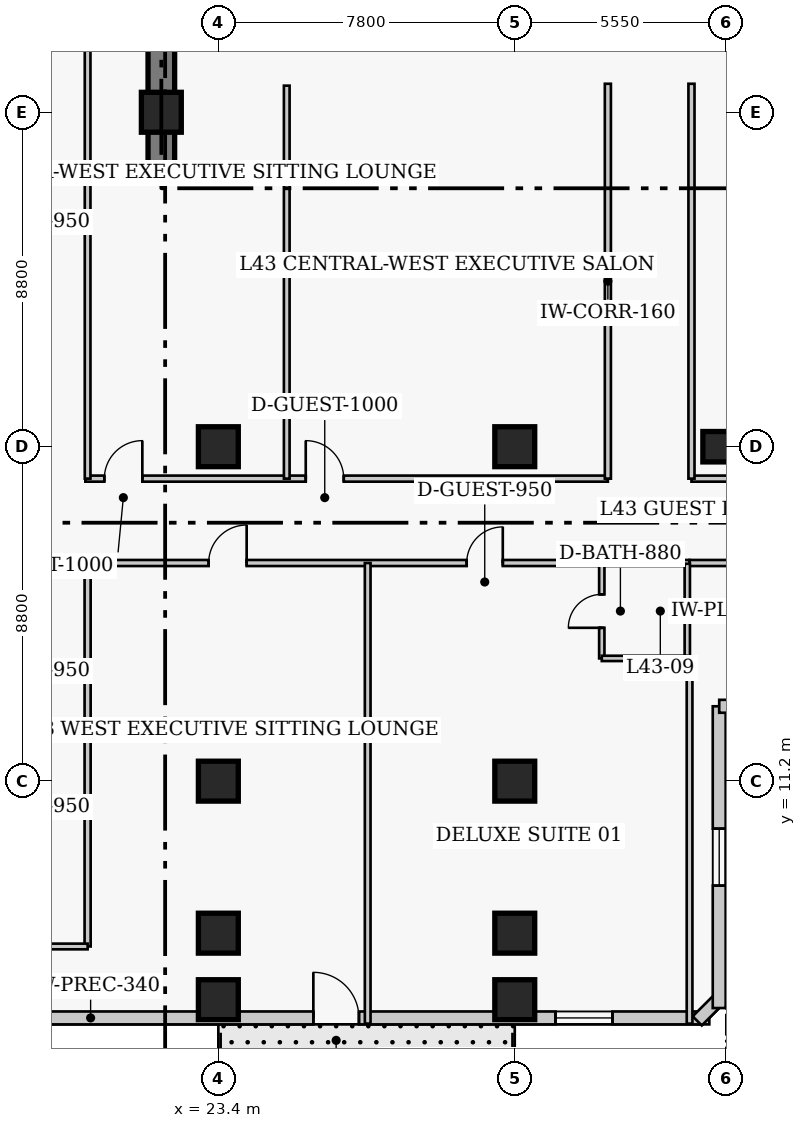
"""IFC4 building model, lengths in metres.
Left out: names, types, materials, properties, quantities, classifications, styles, units other than length and angle.
Written with IfcOpenShell. Run it as: python <this file> out.ifc"""

import sys

from ifc_helpers import new_model, si_unit, direction, frame, frame_2d, origin, origin_2d, place, context, subcontext, project, spatial, rectangle, extrude, element, fill, save


model = new_model("IFC4")
c1 = context("Model", 3, precision=1e-05, world=origin(), true_north=direction((0.0, 1.0)))
c2 = subcontext(c1, "Body", "Model", "MODEL_VIEW")
j1 = project(units=[si_unit("LENGTHUNIT", "METRE"), si_unit("PLANEANGLEUNIT", "RADIAN")], contexts=[c1])
p1 = place(None, origin())
s1 = spatial("IfcSite", under=j1, at=p1, CompositionType="ELEMENT")
p2 = place(p1, origin())
s2 = spatial("IfcBuilding", under=s1, at=p2, CompositionType="ELEMENT")
p3 = place(p2, frame((0.0, 0.0, 172.6)))
s3 = spatial("IfcBuildingStorey", under=s2, at=p3, CompositionType="ELEMENT", Elevation=172.6)
p4 = place(p3, frame((21.9, 27.05, 0.0), z_axis=(0.0, 0.0, 1.0), x_axis=(0.0, 1.0, 0.0)))
e1 = element("IfcWall", 1, at=p4, inside=s3, PredefinedType="SHEAR", context=c2, shape_type="SweptSolid", body=[
    extrude(rectangle(XDim=13.62, YDim=0.7, at=frame_2d((6.81, 0.0))), origin(), (0.0, 0.0, 1.0), 3.8),
])
for number, where, z_axis, x_axis in (
    (2, (23.4, 11.2, 0.0), (0.0, 0.0, 1.0), (1.0, 0.0, 0.0)),
    (3, (23.4, 20.0, 0.0), (0.0, 0.0, 1.0), (1.0, 0.0, 0.0)),
    (4, (31.2, 11.2, 0.0), (0.0, 0.0, 1.0), (1.0, 0.0, 0.0)),
    (5, (31.2, 20.0, 0.0), (0.0, 0.0, 1.0), (1.0, 0.0, 0.0)),
):
    element("IfcColumn", number, at=place(p3, frame(where, z_axis=z_axis, x_axis=x_axis)), inside=s3, PredefinedType="COLUMN", context=c2, shape_type="SweptSolid", body=[
        extrude(rectangle(XDim=1.05, YDim=1.05, at=origin_2d()), origin(), (0.0, 0.0, 1.0), 3.8),
    ])
p5 = place(p3, frame((36.75, 20.0, 0.0), z_axis=(0.0, 0.0, 1.0), x_axis=(1.0, 0.0, 0.0)))
e6 = element("IfcColumn", 6, at=p5, inside=s3, PredefinedType="COLUMN", context=c2, shape_type="SweptSolid", body=[
    extrude(rectangle(XDim=1.2, YDim=0.8, at=origin_2d()), origin(), (0.0, 0.0, 1.0), 3.8),
])
for number, where, z_axis, x_axis in (
    (7, (21.9, 28.8, 0.0), (0.0, 0.0, 1.0), (1.0, 0.0, 0.0)),
    (8, (23.4, 7.2, 0.0), (0.0, 0.0, 1.0), (1.0, 0.0, 0.0)),
    (9, (31.2, 7.2, 0.0), (0.0, 0.0, 1.0), (1.0, 0.0, 0.0)),
    (10, (23.4, 5.45, 0.0), (0.0, 0.0, 1.0), (1.0, 0.0, 0.0)),
    (11, (31.2, 5.45, 0.0), (0.0, 0.0, 1.0), (1.0, 0.0, 0.0)),
):
    element("IfcColumn", number, at=place(p3, frame(where, z_axis=z_axis, x_axis=x_axis)), inside=s3, PredefinedType="COLUMN", context=c2, shape_type="SweptSolid", body=[
        extrude(rectangle(XDim=1.05, YDim=1.05, at=origin_2d()), origin(), (0.0, 0.0, 1.0), 3.8),
    ])
p6 = place(p3, frame((9.63, 4.97, 0.0), z_axis=(0.0, 0.0, 1.0), x_axis=(1.0, 0.0, 0.0)))
e12 = element("IfcWall", 12, at=p6, inside=s3, PredefinedType="SOLIDWALL", context=c2, shape_type="SweptSolid", body=[
    extrude(rectangle(XDim=26.69, YDim=0.34, at=frame_2d((13.345, 0.0))), origin(), (0.0, 0.0, 1.0), 3.55),
])
p7 = place(p6, frame((3.048, 0.0, 0.85)))
e13 = element("IfcOpeningElement", 13, at=p7, cuts=e12, PredefinedType="OPENING", context=c2, shape_type="SweptSolid", body=[
    extrude(rectangle(XDim=1.5, YDim=1.75, at=frame_2d((0.75, 0.875))), frame((0.0, 0.18, 0.0), z_axis=(0.0, -1.0, 0.0), x_axis=(1.0, 0.0, 0.0)), (0.0, 0.0, 1.0), 0.36),
])
p8 = place(p6, frame((22.642, 0.0, 0.85)))
e14 = element("IfcOpeningElement", 14, at=p8, cuts=e12, PredefinedType="OPENING", context=c2, shape_type="SweptSolid", body=[
    extrude(rectangle(XDim=1.5, YDim=1.75, at=frame_2d((0.75, 0.875))), frame((0.0, 0.18, 0.0), z_axis=(0.0, -1.0, 0.0), x_axis=(1.0, 0.0, 0.0)), (0.0, 0.0, 1.0), 0.36),
])
p9 = place(p6, frame((16.27, 0.0, 0.0)))
e15 = element("IfcOpeningElement", 15, at=p9, cuts=e12, PredefinedType="OPENING", context=c2, shape_type="SweptSolid", body=[
    extrude(rectangle(XDim=1.2, YDim=2.1, at=frame_2d((0.6, 1.05))), frame((0.0, 0.18, 0.0), z_axis=(0.0, -1.0, 0.0), x_axis=(1.0, 0.0, 0.0)), (0.0, 0.0, 1.0), 0.36),
])
p10 = place(p3, frame((36.001, 4.892, 0.0), z_axis=(0.0, 0.0, 1.0), x_axis=(0.707106781187, 0.707106781187, 0.0)))
e16 = element("IfcWall", 16, at=p10, inside=s3, PredefinedType="SOLIDWALL", context=c2, shape_type="SweptSolid", body=[
    extrude(rectangle(XDim=0.929, YDim=0.34, at=frame_2d((0.464, 0.0))), origin(), (0.0, 0.0, 1.0), 3.55),
])
p11 = place(p3, frame((36.58, 5.23, 0.0), z_axis=(0.0, 0.0, 1.0), x_axis=(0.0, 1.0, 0.0)))
e17 = element("IfcWall", 17, at=p11, inside=s3, PredefinedType="SOLIDWALL", context=c2, shape_type="SweptSolid", body=[
    extrude(rectangle(XDim=7.94, YDim=0.34, at=frame_2d((3.97, 0.0))), origin(), (0.0, 0.0, 1.0), 3.55),
])
p12 = place(p11, frame((3.22, 0.0, 0.85)))
e18 = element("IfcOpeningElement", 18, at=p12, cuts=e17, PredefinedType="OPENING", context=c2, shape_type="SweptSolid", body=[
    extrude(rectangle(XDim=1.5, YDim=1.75, at=frame_2d((0.75, 0.875))), frame((0.0, 0.18, 0.0), z_axis=(0.0, -1.0, 0.0), x_axis=(1.0, 0.0, 0.0)), (0.0, 0.0, 1.0), 0.36),
])
p13 = place(p3, frame((36.58, 13.17, 0.0), z_axis=(0.0, 0.0, 1.0), x_axis=(1.0, 0.0, 0.0)))
e19 = element("IfcWall", 19, at=p13, inside=s3, PredefinedType="SOLIDWALL", context=c2, shape_type="SweptSolid", body=[
    extrude(rectangle(XDim=4.84, YDim=0.34, at=frame_2d((2.42, 0.0))), origin(), (0.0, 0.0, 1.0), 3.55),
])
p14 = place(p13, frame((1.67, 0.0, 0.85)))
e20 = element("IfcOpeningElement", 20, at=p14, cuts=e19, PredefinedType="OPENING", context=c2, shape_type="SweptSolid", body=[
    extrude(rectangle(XDim=1.5, YDim=1.75, at=frame_2d((0.75, 0.875))), frame((0.0, 0.18, 0.0), z_axis=(0.0, -1.0, 0.0), x_axis=(1.0, 0.0, 0.0)), (0.0, 0.0, 1.0), 0.36),
])
p15 = place(p3, frame((19.9, 19.16, 0.0), z_axis=(0.0, 0.0, 1.0), x_axis=(1.0, 0.0, 0.0)))
e21 = element("IfcWall", 21, at=p15, inside=s3, PredefinedType="PARTITIONING", context=c2, shape_type="SweptSolid", body=[
    extrude(rectangle(XDim=13.75, YDim=0.16, at=frame_2d((6.875, 0.0))), origin(), (0.0, 0.0, 1.0), 3.55),
])
p16 = place(p15, frame((0.5, 0.0, 0.0)))
e22 = element("IfcOpeningElement", 22, at=p16, cuts=e21, PredefinedType="OPENING", context=c2, shape_type="SweptSolid", body=[
    extrude(rectangle(XDim=1.0, YDim=2.15, at=frame_2d((0.5, 1.075))), frame((0.0, 0.09, 0.0), z_axis=(0.0, -1.0, 0.0), x_axis=(1.0, 0.0, 0.0)), (0.0, 0.0, 1.0), 0.18),
])
p17 = place(p15, frame((5.8, 0.0, 0.0)))
e23 = element("IfcOpeningElement", 23, at=p17, cuts=e21, PredefinedType="OPENING", context=c2, shape_type="SweptSolid", body=[
    extrude(rectangle(XDim=1.0, YDim=2.15, at=frame_2d((0.5, 1.075))), frame((0.0, 0.09, 0.0), z_axis=(0.0, -1.0, 0.0), x_axis=(1.0, 0.0, 0.0)), (0.0, 0.0, 1.0), 0.18),
])
p18 = place(p3, frame((35.85, 19.16, 0.0), z_axis=(0.0, 0.0, 1.0), x_axis=(1.0, 0.0, 0.0)))
e24 = element("IfcWall", 24, at=p18, inside=s3, PredefinedType="PARTITIONING", context=c2, shape_type="SweptSolid", body=[
    extrude(rectangle(XDim=23.0, YDim=0.16, at=frame_2d((11.5, 0.0))), origin(), (0.0, 0.0, 1.0), 3.55),
])
p19 = place(p18, frame((7.231, 0.0, 0.0)))
e25 = element("IfcOpeningElement", 25, at=p19, cuts=e24, PredefinedType="OPENING", context=c2, shape_type="SweptSolid", body=[
    extrude(rectangle(XDim=1.0, YDim=2.15, at=frame_2d((0.5, 1.075))), frame((0.0, 0.09, 0.0), z_axis=(0.0, -1.0, 0.0), x_axis=(1.0, 0.0, 0.0)), (0.0, 0.0, 1.0), 0.18),
])
p20 = place(p18, frame((13.45, 0.0, 0.0)))
e26 = element("IfcOpeningElement", 26, at=p20, cuts=e24, PredefinedType="OPENING", context=c2, shape_type="SweptSolid", body=[
    extrude(rectangle(XDim=1.0, YDim=2.15, at=frame_2d((0.5, 1.075))), frame((0.0, 0.09, 0.0), z_axis=(0.0, -1.0, 0.0), x_axis=(1.0, 0.0, 0.0)), (0.0, 0.0, 1.0), 0.18),
])
for number, where, z_axis, x_axis in (
    (27, (33.65, 19.16, 0.0), (0.0, 0.0, 1.0), (0.0, 1.0, 0.0)),
    (28, (35.85, 19.16, 0.0), (0.0, 0.0, 1.0), (0.0, 1.0, 0.0)),
):
    element("IfcWall", number, at=place(p3, frame(where, z_axis=z_axis, x_axis=x_axis)), inside=s3, PredefinedType="PARTITIONING", context=c2, shape_type="SweptSolid", body=[
        extrude(rectangle(XDim=10.39, YDim=0.16, at=frame_2d((5.195, 0.0))), origin(), (0.0, 0.0, 1.0), 3.55),
    ])
p21 = place(p3, frame((19.9, 16.94, 0.0), z_axis=(0.0, 0.0, 1.0), x_axis=(1.0, 0.0, 0.0)))
e29 = element("IfcWall", 29, at=p21, inside=s3, PredefinedType="PARTITIONING", context=c2, shape_type="SweptSolid", body=[
    extrude(rectangle(XDim=15.9, YDim=0.16, at=frame_2d((7.95, 0.0))), origin(), (0.0, 0.0, 1.0), 3.55),
])
p22 = place(p21, frame((3.245, 0.0, 0.0)))
e30 = element("IfcOpeningElement", 30, at=p22, cuts=e29, PredefinedType="OPENING", context=c2, shape_type="SweptSolid", body=[
    extrude(rectangle(XDim=1.0, YDim=2.15, at=frame_2d((0.5, 1.075))), frame((0.0, 0.09, 0.0), z_axis=(0.0, -1.0, 0.0), x_axis=(1.0, 0.0, 0.0)), (0.0, 0.0, 1.0), 0.18),
])
p23 = place(p21, frame((10.035, 0.0, 0.0)))
e31 = element("IfcOpeningElement", 31, at=p23, cuts=e29, PredefinedType="OPENING", context=c2, shape_type="SweptSolid", body=[
    extrude(rectangle(XDim=0.95, YDim=2.1, at=frame_2d((0.475, 1.05))), frame((0.0, 0.09, 0.0), z_axis=(0.0, -1.0, 0.0), x_axis=(1.0, 0.0, 0.0)), (0.0, 0.0, 1.0), 0.18),
])
p24 = place(p3, frame((35.8, 16.94, 0.0), z_axis=(0.0, 0.0, 1.0), x_axis=(1.0, 0.0, 0.0)))
e32 = element("IfcWall", 32, at=p24, inside=s3, PredefinedType="PARTITIONING", context=c2, shape_type="SweptSolid", body=[
    extrude(rectangle(XDim=23.05, YDim=0.16, at=frame_2d((11.525, 0.0))), origin(), (0.0, 0.0, 1.0), 3.55),
])
p25 = place(p24, frame((7.222, 0.0, 0.0)))
e33 = element("IfcOpeningElement", 33, at=p25, cuts=e32, PredefinedType="OPENING", context=c2, shape_type="SweptSolid", body=[
    extrude(rectangle(XDim=1.0, YDim=2.15, at=frame_2d((0.5, 1.075))), frame((0.0, 0.09, 0.0), z_axis=(0.0, -1.0, 0.0), x_axis=(1.0, 0.0, 0.0)), (0.0, 0.0, 1.0), 0.18),
])
p26 = place(p24, frame((11.639, 0.0, 0.0)))
e34 = element("IfcOpeningElement", 34, at=p26, cuts=e32, PredefinedType="OPENING", context=c2, shape_type="SweptSolid", body=[
    extrude(rectangle(XDim=0.95, YDim=2.1, at=frame_2d((0.475, 1.05))), frame((0.0, 0.09, 0.0), z_axis=(0.0, -1.0, 0.0), x_axis=(1.0, 0.0, 0.0)), (0.0, 0.0, 1.0), 0.18),
])
p27 = place(p24, frame((17.936, 0.0, 0.0)))
e35 = element("IfcOpeningElement", 35, at=p27, cuts=e32, PredefinedType="OPENING", context=c2, shape_type="SweptSolid", body=[
    extrude(rectangle(XDim=0.95, YDim=2.1, at=frame_2d((0.475, 1.05))), frame((0.0, 0.09, 0.0), z_axis=(0.0, -1.0, 0.0), x_axis=(1.0, 0.0, 0.0)), (0.0, 0.0, 1.0), 0.18),
])
p28 = place(p3, frame((19.96, 6.85, 0.0), z_axis=(0.0, 0.0, 1.0), x_axis=(0.0, 1.0, 0.0)))
e36 = element("IfcWall", 36, at=p28, inside=s3, PredefinedType="PARTITIONING", context=c2, shape_type="SweptSolid", body=[
    extrude(rectangle(XDim=10.09, YDim=0.16, at=frame_2d((5.045, 0.0))), origin(), (0.0, 0.0, 1.0), 3.55),
])
p29 = place(p3, frame((17.74, 6.85, 0.0), z_axis=(0.0, 0.0, 1.0), x_axis=(1.0, 0.0, 0.0)))
e37 = element("IfcWall", 37, at=p29, inside=s3, PredefinedType="PARTITIONING", context=c2, shape_type="SweptSolid", body=[
    extrude(rectangle(XDim=2.22, YDim=0.15, at=frame_2d((1.11, 0.0))), origin(), (0.0, 0.0, 1.0), 3.55),
])
p30 = place(p3, frame((19.96, 19.16, 0.0), z_axis=(0.0, 0.0, 1.0), x_axis=(0.0, 1.0, 0.0)))
e38 = element("IfcWall", 38, at=p30, inside=s3, PredefinedType="PARTITIONING", context=c2, shape_type="SweptSolid", body=[
    extrude(rectangle(XDim=13.64, YDim=0.15, at=frame_2d((6.82, 0.0))), origin(), (0.0, 0.0, 1.0), 3.55),
])
p31 = place(p3, frame((25.2, 19.16, 0.0), z_axis=(0.0, 0.0, 1.0), x_axis=(0.0, 1.0, 0.0)))
e39 = element("IfcWall", 39, at=p31, inside=s3, PredefinedType="PARTITIONING", context=c2, shape_type="SweptSolid", body=[
    extrude(rectangle(XDim=10.34, YDim=0.15, at=frame_2d((5.17, 0.0))), origin(), (0.0, 0.0, 1.0), 3.55),
])
p32 = place(p3, frame((27.33, 4.82, 0.0), z_axis=(0.0, 0.0, 1.0), x_axis=(0.0, 1.0, 0.0)))
e40 = element("IfcWall", 40, at=p32, inside=s3, PredefinedType="PARTITIONING", context=c2, shape_type="SweptSolid", body=[
    extrude(rectangle(XDim=12.12, YDim=0.15, at=frame_2d((6.06, 0.0))), origin(), (0.0, 0.0, 1.0), 3.093),
])
p33 = place(p3, frame((33.49, 14.43, 0.0), z_axis=(0.0, 0.0, 1.0), x_axis=(0.0, 1.0, 0.0)))
e41 = element("IfcWall", 41, at=p33, inside=s3, PredefinedType="PLUMBINGWALL", context=c2, shape_type="SweptSolid", body=[
    extrude(rectangle(XDim=2.49, YDim=0.14, at=frame_2d((1.245, 0.0))), origin(), (0.0, 0.0, 1.0), 3.55),
])
p34 = place(p33, frame((0.805, 0.0, 0.0)))
e42 = element("IfcOpeningElement", 42, at=p34, cuts=e41, PredefinedType="OPENING", context=c2, shape_type="SweptSolid", body=[
    extrude(rectangle(XDim=0.88, YDim=2.05, at=frame_2d((0.44, 1.025))), frame((0.0, 0.08, 0.0), z_axis=(0.0, -1.0, 0.0), x_axis=(1.0, 0.0, 0.0)), (0.0, 0.0, 1.0), 0.16),
])
p35 = place(p3, frame((35.74, 14.43, 0.0), z_axis=(0.0, 0.0, 1.0), x_axis=(0.0, 1.0, 0.0)))
e43 = element("IfcWall", 43, at=p35, inside=s3, PredefinedType="PLUMBINGWALL", context=c2, shape_type="SweptSolid", body=[
    extrude(rectangle(XDim=2.49, YDim=0.14, at=frame_2d((1.245, 0.0))), origin(), (0.0, 0.0, 1.0), 3.55),
])
p36 = place(p3, frame((33.49, 14.43, 0.0), z_axis=(0.0, 0.0, 1.0), x_axis=(1.0, 0.0, 0.0)))
e44 = element("IfcWall", 44, at=p36, inside=s3, PredefinedType="PLUMBINGWALL", context=c2, shape_type="SweptSolid", body=[
    extrude(rectangle(XDim=2.25, YDim=0.14, at=frame_2d((1.125, 0.0))), origin(), (0.0, 0.0, 1.0), 3.55),
])
p37 = place(p3, frame((35.8, 4.82, 0.0), z_axis=(0.0, 0.0, 1.0), x_axis=(0.0, 1.0, 0.0)))
e45 = element("IfcWall", 45, at=p37, inside=s3, PredefinedType="PARTITIONING", context=c2, shape_type="SweptSolid", body=[
    extrude(rectangle(XDim=9.61, YDim=0.15, at=frame_2d((4.805, 0.0))), origin(), (0.0, 0.0, 1.0), 3.55),
])
p38 = place(p8, origin())
e46 = element("IfcWindow", 46, at=p38, inside=s3, PartitioningType="SINGLE_PANEL", PredefinedType="WINDOW", context=c2, shape_type="SweptSolid", body=[
    extrude(rectangle(XDim=1.5, YDim=1.75, at=frame_2d((0.75, 0.875))), frame((0.0, 0.03, 0.0), z_axis=(0.0, -1.0, 0.0), x_axis=(1.0, 0.0, 0.0)), (0.0, 0.0, 1.0), 0.06),
])
fill(e14, e46)
p39 = place(p12, origin())
e47 = element("IfcWindow", 47, at=p39, inside=s3, PartitioningType="SINGLE_PANEL", PredefinedType="WINDOW", context=c2, shape_type="SweptSolid", body=[
    extrude(rectangle(XDim=1.5, YDim=1.75, at=frame_2d((0.75, 0.875))), frame((0.0, 0.03, 0.0), z_axis=(0.0, -1.0, 0.0), x_axis=(1.0, 0.0, 0.0)), (0.0, 0.0, 1.0), 0.06),
])
fill(e18, e47)
p40 = place(p9, origin())
e48 = element("IfcDoor", 48, at=p40, inside=s3, OperationType="SINGLE_SWING_LEFT", PredefinedType="DOOR", context=c2, shape_type="SweptSolid", body=[
    extrude(rectangle(XDim=1.2, YDim=2.1, at=frame_2d((0.6, 1.05))), frame((0.0, 0.025, 0.0), z_axis=(0.0, -1.0, 0.0), x_axis=(1.0, 0.0, 0.0)), (0.0, 0.0, 1.0), 0.05),
])
fill(e15, e48)
p41 = place(p16, origin())
e49 = element("IfcDoor", 49, at=p41, inside=s3, OperationType="SINGLE_SWING_RIGHT", PredefinedType="DOOR", context=c2, shape_type="SweptSolid", body=[
    extrude(rectangle(XDim=1.0, YDim=2.15, at=frame_2d((0.5, 1.075))), frame((0.0, 0.025, 0.0), z_axis=(0.0, -1.0, 0.0), x_axis=(1.0, 0.0, 0.0)), (0.0, 0.0, 1.0), 0.05),
])
fill(e22, e49)
p42 = place(p17, origin())
e50 = element("IfcDoor", 50, at=p42, inside=s3, OperationType="SINGLE_SWING_LEFT", PredefinedType="DOOR", context=c2, shape_type="SweptSolid", body=[
    extrude(rectangle(XDim=1.0, YDim=2.15, at=frame_2d((0.5, 1.075))), frame((0.0, 0.025, 0.0), z_axis=(0.0, -1.0, 0.0), x_axis=(1.0, 0.0, 0.0)), (0.0, 0.0, 1.0), 0.05),
])
fill(e23, e50)
p43 = place(p22, origin())
e51 = element("IfcDoor", 51, at=p43, inside=s3, OperationType="SINGLE_SWING_RIGHT", PredefinedType="DOOR", context=c2, shape_type="SweptSolid", body=[
    extrude(rectangle(XDim=1.0, YDim=2.15, at=frame_2d((0.5, 1.075))), frame((0.0, 0.025, 0.0), z_axis=(0.0, -1.0, 0.0), x_axis=(1.0, 0.0, 0.0)), (0.0, 0.0, 1.0), 0.05),
])
fill(e30, e51)
p44 = place(p34, origin())
e52 = element("IfcDoor", 52, at=p44, inside=s3, OperationType="SINGLE_SWING_LEFT", PredefinedType="DOOR", context=c2, shape_type="SweptSolid", body=[
    extrude(rectangle(XDim=0.88, YDim=2.05, at=frame_2d((0.44, 1.025))), frame((0.0, 0.025, 0.0), z_axis=(0.0, -1.0, 0.0), x_axis=(1.0, 0.0, 0.0)), (0.0, 0.0, 1.0), 0.05),
])
fill(e42, e52)
p45 = place(p23, origin())
e53 = element("IfcDoor", 53, at=p45, inside=s3, OperationType="SINGLE_SWING_RIGHT", PredefinedType="DOOR", context=c2, shape_type="SweptSolid", body=[
    extrude(rectangle(XDim=0.95, YDim=2.1, at=frame_2d((0.475, 1.05))), frame((0.0, 0.025, 0.0), z_axis=(0.0, -1.0, 0.0), x_axis=(1.0, 0.0, 0.0)), (0.0, 0.0, 1.0), 0.05),
])
fill(e31, e53)
save(model, sys.argv[1])
